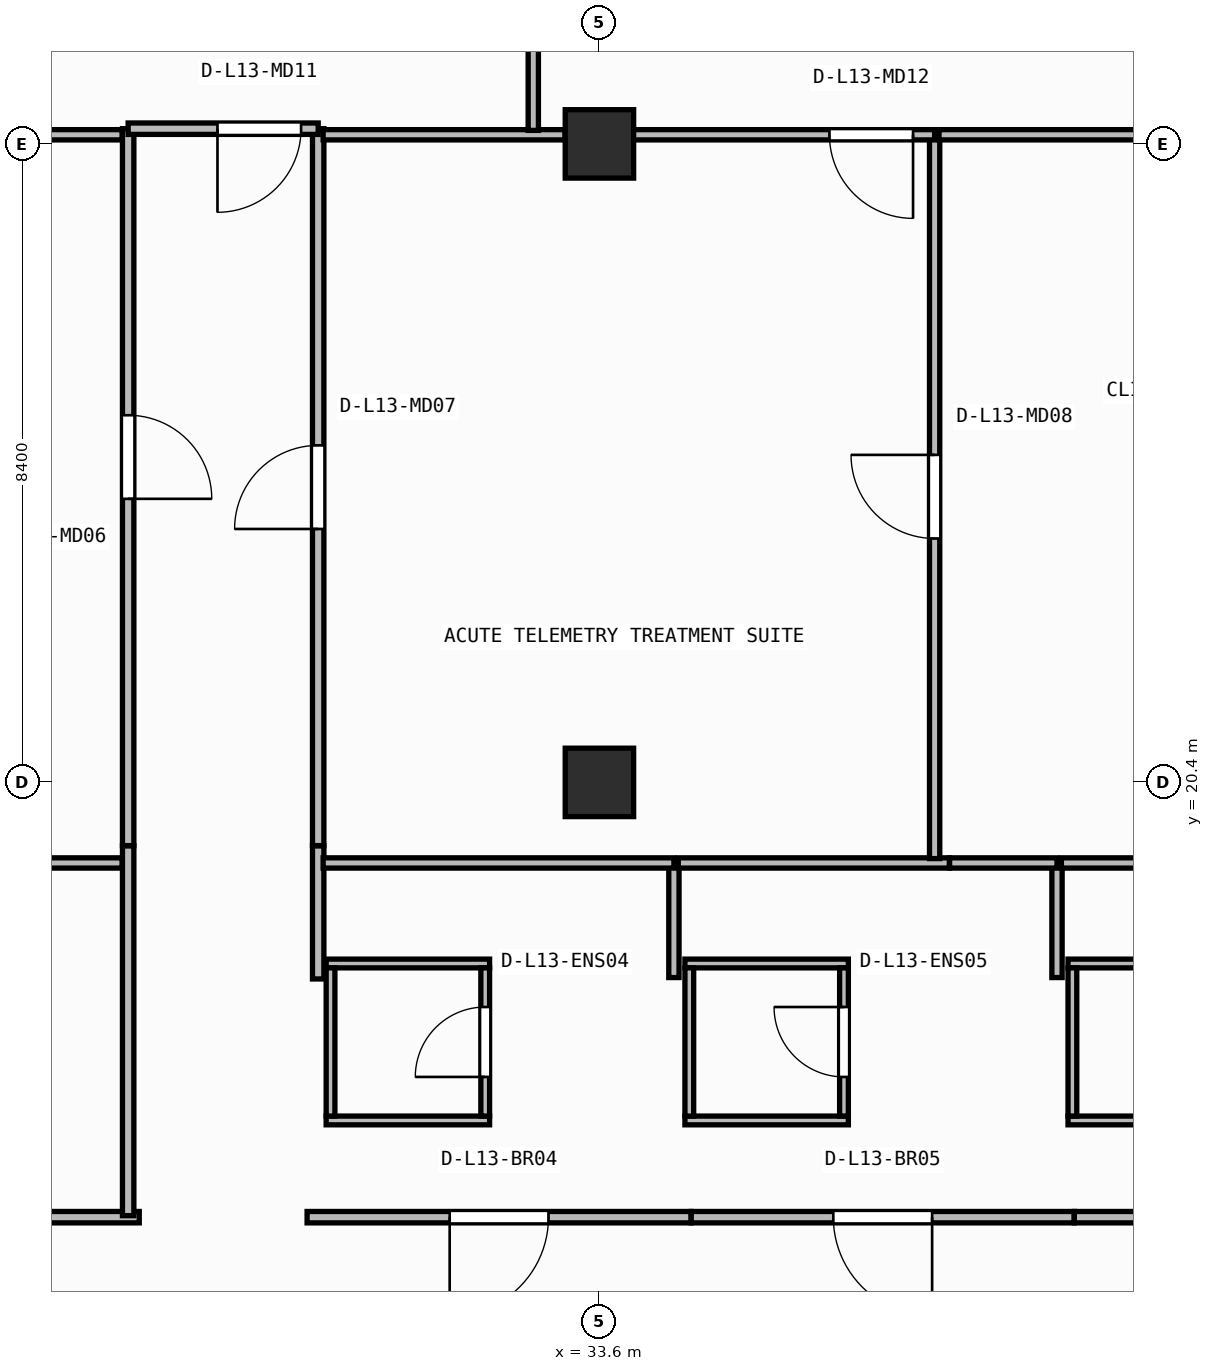
"""IFC4 building model, lengths in metres.
Left out: names, types, materials, properties, quantities, classifications, styles, units other than length and angle.
Written with IfcOpenShell. Run it as: python <this file> out.ifc"""

import sys

from ifc_helpers import new_model, si_unit, direction, frame, frame_2d, origin, origin_2d, place, context, subcontext, project, spatial, rectangle, extrude, element, fill, save


model = new_model("IFC4")
c1 = context("Model", 3, precision=1e-05, world=origin(), true_north=direction((0.0, 1.0)))
c2 = subcontext(c1, "Body", "Model", "MODEL_VIEW")
j1 = project(units=[si_unit("LENGTHUNIT", "METRE"), si_unit("PLANEANGLEUNIT", "RADIAN")], contexts=[c1])
p1 = place(None, origin())
s1 = spatial("IfcSite", under=j1, at=p1, CompositionType="ELEMENT")
p2 = place(p1, origin())
s2 = spatial("IfcBuilding", under=s1, at=p2, CompositionType="ELEMENT")
p3 = place(p2, frame((0.0, 0.0, 54.1)))
s3 = spatial("IfcBuildingStorey", under=s2, at=p3, CompositionType="ELEMENT", Elevation=54.1)
for number, where, z_axis, x_axis in (
    (1, (33.6, 20.4, 0.0), (0.0, 0.0, 1.0), (1.0, 0.0, 0.0)),
    (2, (33.6, 28.8, 0.0), (0.0, 0.0, 1.0), (1.0, 0.0, 0.0)),
):
    element("IfcColumn", number, at=place(p3, frame(where, z_axis=z_axis, x_axis=x_axis)), inside=s3, PredefinedType="COLUMN", context=c2, shape_type="SweptSolid", body=[
        extrude(rectangle(XDim=0.9, YDim=0.9, at=origin_2d()), origin(), (0.0, 0.0, 1.0), 3.95),
    ])
p4 = place(p3, frame((30.005, 15.952, 0.0), z_axis=(0.0, 0.0, 1.0), x_axis=(1.0, 0.0, 0.0)))
e3 = element("IfcWall", 3, at=p4, inside=s3, PredefinedType="PARTITIONING", context=c2, shape_type="SweptSolid", body=[
    extrude(rectangle(XDim=2.15, YDim=0.115, at=frame_2d((1.075, 0.0))), origin(), (0.0, 0.0, 1.0), 3.478),
])
p5 = place(p3, frame((30.005, 18.018, 0.0), z_axis=(0.0, 0.0, 1.0), x_axis=(1.0, 0.0, 0.0)))
e4 = element("IfcWall", 4, at=p5, inside=s3, PredefinedType="PARTITIONING", context=c2, shape_type="SweptSolid", body=[
    extrude(rectangle(XDim=2.15, YDim=0.115, at=frame_2d((1.075, 0.0))), origin(), (0.0, 0.0, 1.0), 3.71),
])
p6 = place(p3, frame((30.062, 16.01, 0.0), z_axis=(0.0, 0.0, 1.0), x_axis=(0.0, 1.0, 0.0)))
e5 = element("IfcWall", 5, at=p6, inside=s3, PredefinedType="PARTITIONING", context=c2, shape_type="SweptSolid", body=[
    extrude(rectangle(XDim=1.95, YDim=0.115, at=frame_2d((0.975, 0.0))), origin(), (0.0, 0.0, 1.0), 3.71),
])
p7 = place(p3, frame((32.097, 16.01, 0.0), z_axis=(0.0, 0.0, 1.0), x_axis=(0.0, 1.0, 0.0)))
e6 = element("IfcWall", 6, at=p7, inside=s3, PredefinedType="PARTITIONING", context=c2, shape_type="SweptSolid", body=[
    extrude(rectangle(XDim=1.95, YDim=0.115, at=frame_2d((0.975, 0.0))), origin(), (0.0, 0.0, 1.0), 3.71),
])
p8 = place(p7, frame((0.515, 0.0, 0.0)))
e7 = element("IfcOpeningElement", 7, at=p8, cuts=e6, PredefinedType="OPENING", context=c2, shape_type="SweptSolid", body=[
    extrude(rectangle(XDim=0.92, YDim=2.1, at=frame_2d((0.46, 1.05))), frame((0.0, 0.067, 0.0), z_axis=(0.0, -1.0, 0.0), x_axis=(1.0, 0.0, 0.0)), (0.0, 0.0, 1.0), 0.135),
])
p9 = place(p3, frame((34.725, 15.952, 0.0), z_axis=(0.0, 0.0, 1.0), x_axis=(1.0, 0.0, 0.0)))
e8 = element("IfcWall", 8, at=p9, inside=s3, PredefinedType="PARTITIONING", context=c2, shape_type="SweptSolid", body=[
    extrude(rectangle(XDim=2.15, YDim=0.115, at=frame_2d((1.075, 0.0))), origin(), (0.0, 0.0, 1.0), 3.478),
])
p10 = place(p3, frame((34.725, 18.018, 0.0), z_axis=(0.0, 0.0, 1.0), x_axis=(1.0, 0.0, 0.0)))
e9 = element("IfcWall", 9, at=p10, inside=s3, PredefinedType="PARTITIONING", context=c2, shape_type="SweptSolid", body=[
    extrude(rectangle(XDim=2.15, YDim=0.115, at=frame_2d((1.075, 0.0))), origin(), (0.0, 0.0, 1.0), 3.71),
])
p11 = place(p3, frame((34.782, 16.01, 0.0), z_axis=(0.0, 0.0, 1.0), x_axis=(0.0, 1.0, 0.0)))
e10 = element("IfcWall", 10, at=p11, inside=s3, PredefinedType="PARTITIONING", context=c2, shape_type="SweptSolid", body=[
    extrude(rectangle(XDim=1.95, YDim=0.115, at=frame_2d((0.975, 0.0))), origin(), (0.0, 0.0, 1.0), 3.71),
])
p12 = place(p3, frame((36.817, 16.01, 0.0), z_axis=(0.0, 0.0, 1.0), x_axis=(0.0, 1.0, 0.0)))
e11 = element("IfcWall", 11, at=p12, inside=s3, PredefinedType="PARTITIONING", context=c2, shape_type="SweptSolid", body=[
    extrude(rectangle(XDim=1.95, YDim=0.115, at=frame_2d((0.975, 0.0))), origin(), (0.0, 0.0, 1.0), 3.71),
])
p13 = place(p12, frame((0.515, 0.0, 0.0)))
e12 = element("IfcOpeningElement", 12, at=p13, cuts=e11, PredefinedType="OPENING", context=c2, shape_type="SweptSolid", body=[
    extrude(rectangle(XDim=0.92, YDim=2.1, at=frame_2d((0.46, 1.05))), frame((0.0, 0.067, 0.0), z_axis=(0.0, -1.0, 0.0), x_axis=(1.0, 0.0, 0.0)), (0.0, 0.0, 1.0), 0.135),
])
p14 = place(p3, frame((39.765, 15.952, 0.0), z_axis=(0.0, 0.0, 1.0), x_axis=(1.0, 0.0, 0.0)))
e13 = element("IfcWall", 13, at=p14, inside=s3, PredefinedType="PARTITIONING", context=c2, shape_type="SweptSolid", body=[
    extrude(rectangle(XDim=2.15, YDim=0.115, at=frame_2d((1.075, 0.0))), origin(), (0.0, 0.0, 1.0), 3.478),
])
p15 = place(p3, frame((39.765, 18.018, 0.0), z_axis=(0.0, 0.0, 1.0), x_axis=(1.0, 0.0, 0.0)))
e14 = element("IfcWall", 14, at=p15, inside=s3, PredefinedType="PARTITIONING", context=c2, shape_type="SweptSolid", body=[
    extrude(rectangle(XDim=2.15, YDim=0.115, at=frame_2d((1.075, 0.0))), origin(), (0.0, 0.0, 1.0), 3.71),
])
p16 = place(p3, frame((39.823, 16.01, 0.0), z_axis=(0.0, 0.0, 1.0), x_axis=(0.0, 1.0, 0.0)))
e15 = element("IfcWall", 15, at=p16, inside=s3, PredefinedType="PARTITIONING", context=c2, shape_type="SweptSolid", body=[
    extrude(rectangle(XDim=1.95, YDim=0.115, at=frame_2d((0.975, 0.0))), origin(), (0.0, 0.0, 1.0), 3.71),
])
p17 = place(p3, frame((27.546, 14.68, 0.0), z_axis=(0.0, 0.0, 1.0), x_axis=(-1.0, 0.0, 0.0)))
e16 = element("IfcWall", 16, at=p17, inside=s3, PredefinedType="PARTITIONING", context=c2, shape_type="SweptSolid", body=[
    extrude(rectangle(XDim=4.948, YDim=0.15, at=frame_2d((2.474, 0.0))), origin(), (0.0, 0.0, 1.0), 3.71),
])
p18 = place(p17, frame((1.924, 0.0, 0.0)))
e17 = element("IfcOpeningElement", 17, at=p18, cuts=e16, PredefinedType="OPENING", context=c2, shape_type="SweptSolid", body=[
    extrude(rectangle(XDim=1.1, YDim=2.1, at=frame_2d((0.55, 1.05))), frame((0.0, 0.085, 0.0), z_axis=(0.0, -1.0, 0.0), x_axis=(1.0, 0.0, 0.0)), (0.0, 0.0, 1.0), 0.17),
])
p19 = place(p3, frame((34.806, 14.68, 0.0), z_axis=(0.0, 0.0, 1.0), x_axis=(-1.0, 0.0, 0.0)))
e18 = element("IfcWall", 18, at=p19, inside=s3, PredefinedType="PARTITIONING", context=c2, shape_type="SweptSolid", body=[
    extrude(rectangle(XDim=5.052, YDim=0.15, at=frame_2d((2.526, 0.0))), origin(), (0.0, 0.0, 1.0), 3.71),
])
p20 = place(p19, frame((1.876, 0.0, 0.0)))
e19 = element("IfcOpeningElement", 19, at=p20, cuts=e18, PredefinedType="OPENING", context=c2, shape_type="SweptSolid", body=[
    extrude(rectangle(XDim=1.3, YDim=2.15, at=frame_2d((0.65, 1.075))), frame((0.0, 0.085, 0.0), z_axis=(0.0, -1.0, 0.0), x_axis=(1.0, 0.0, 0.0)), (0.0, 0.0, 1.0), 0.17),
])
p21 = place(p3, frame((39.846, 14.68, 0.0), z_axis=(0.0, 0.0, 1.0), x_axis=(-1.0, 0.0, 0.0)))
e20 = element("IfcWall", 20, at=p21, inside=s3, PredefinedType="PARTITIONING", context=c2, shape_type="SweptSolid", body=[
    extrude(rectangle(XDim=5.038, YDim=0.15, at=frame_2d((2.519, 0.0))), origin(), (0.0, 0.0, 1.0), 3.71),
])
p22 = place(p21, frame((1.869, 0.0, 0.0)))
e21 = element("IfcOpeningElement", 21, at=p22, cuts=e20, PredefinedType="OPENING", context=c2, shape_type="SweptSolid", body=[
    extrude(rectangle(XDim=1.3, YDim=2.15, at=frame_2d((0.65, 1.075))), frame((0.0, 0.085, 0.0), z_axis=(0.0, -1.0, 0.0), x_axis=(1.0, 0.0, 0.0)), (0.0, 0.0, 1.0), 0.17),
])
p23 = place(p3, frame((44.136, 14.68, 0.0), z_axis=(0.0, 0.0, 1.0), x_axis=(-1.0, 0.0, 0.0)))
e22 = element("IfcWall", 22, at=p23, inside=s3, PredefinedType="PARTITIONING", context=c2, shape_type="SweptSolid", body=[
    extrude(rectangle(XDim=4.288, YDim=0.15, at=frame_2d((2.144, 0.0))), origin(), (0.0, 0.0, 1.0), 3.71),
])
p24 = place(p23, frame((1.494, 0.0, 0.0)))
e23 = element("IfcOpeningElement", 23, at=p24, cuts=e22, PredefinedType="OPENING", context=c2, shape_type="SweptSolid", body=[
    extrude(rectangle(XDim=1.3, YDim=2.15, at=frame_2d((0.65, 1.075))), frame((0.0, 0.085, 0.0), z_axis=(0.0, -1.0, 0.0), x_axis=(1.0, 0.0, 0.0)), (0.0, 0.0, 1.0), 0.17),
])
p25 = place(p3, frame((27.4, 19.566, 0.0), z_axis=(0.0, 0.0, 1.0), x_axis=(0.0, -1.0, 0.0)))
e24 = element("IfcWall", 24, at=p25, inside=s3, PredefinedType="PARTITIONING", context=c2, shape_type="SweptSolid", body=[
    extrude(rectangle(XDim=4.866, YDim=0.15, at=frame_2d((2.433, 0.0))), origin(), (0.0, 0.0, 1.0), 3.71),
])
p26 = place(p3, frame((27.4, 29.0, 0.0), z_axis=(0.0, 0.0, 1.0), x_axis=(0.0, -1.0, 0.0)))
e25 = element("IfcWall", 25, at=p26, inside=s3, PredefinedType="PARTITIONING", context=c2, shape_type="SweptSolid", body=[
    extrude(rectangle(XDim=9.432, YDim=0.15, at=frame_2d((4.716, 0.0))), origin(), (0.0, 0.0, 1.0), 3.71),
])
p27 = place(p26, frame((3.769, 0.0, 0.0)))
e26 = element("IfcOpeningElement", 26, at=p27, cuts=e25, PredefinedType="OPENING", context=c2, shape_type="SweptSolid", body=[
    extrude(rectangle(XDim=1.1, YDim=2.1, at=frame_2d((0.55, 1.05))), frame((0.0, 0.085, 0.0), z_axis=(0.0, -1.0, 0.0), x_axis=(1.0, 0.0, 0.0)), (0.0, 0.0, 1.0), 0.17),
])
p28 = place(p3, frame((29.9, 17.814, 0.0), z_axis=(0.0, 0.0, 1.0), x_axis=(0.0, 1.0, 0.0)))
e27 = element("IfcWall", 27, at=p28, inside=s3, PredefinedType="PARTITIONING", context=c2, shape_type="SweptSolid", body=[
    extrude(rectangle(XDim=1.752, YDim=0.15, at=frame_2d((0.876, 0.0))), origin(), (0.0, 0.0, 1.0), 3.71),
])
p29 = place(p3, frame((29.9, 19.568, 0.0), z_axis=(0.0, 0.0, 1.0), x_axis=(0.0, 1.0, 0.0)))
e28 = element("IfcWall", 28, at=p29, inside=s3, PredefinedType="PARTITIONING", context=c2, shape_type="SweptSolid", body=[
    extrude(rectangle(XDim=9.432, YDim=0.15, at=frame_2d((4.716, 0.0))), origin(), (0.0, 0.0, 1.0), 3.71),
])
p30 = place(p29, frame((4.166, 0.0, 0.0)))
e29 = element("IfcOpeningElement", 29, at=p30, cuts=e28, PredefinedType="OPENING", context=c2, shape_type="SweptSolid", body=[
    extrude(rectangle(XDim=1.1, YDim=2.1, at=frame_2d((0.55, 1.05))), frame((0.0, 0.085, 0.0), z_axis=(0.0, -1.0, 0.0), x_axis=(1.0, 0.0, 0.0)), (0.0, 0.0, 1.0), 0.17),
])
p31 = place(p3, frame((29.9, 29.0, 0.0), z_axis=(0.0, 0.0, 1.0), x_axis=(-1.0, 0.0, 0.0)))
e30 = element("IfcWall", 30, at=p31, inside=s3, PredefinedType="PARTITIONING", context=c2, shape_type="SweptSolid", body=[
    extrude(rectangle(XDim=2.5, YDim=0.15, at=frame_2d((1.25, 0.0))), origin(), (0.0, 0.0, 1.0), 3.326),
])
p32 = place(p31, frame((0.225, 0.0, 0.0)))
e31 = element("IfcOpeningElement", 31, at=p32, cuts=e30, PredefinedType="OPENING", context=c2, shape_type="SweptSolid", body=[
    extrude(rectangle(XDim=1.1, YDim=2.1, at=frame_2d((0.55, 1.05))), frame((0.0, 0.085, 0.0), z_axis=(0.0, -1.0, 0.0), x_axis=(1.0, 0.0, 0.0)), (0.0, 0.0, 1.0), 0.17),
])
p33 = place(p3, frame((27.32, 19.34, 0.0), z_axis=(0.0, 0.0, 1.0), x_axis=(-1.0, 0.0, 0.0)))
e32 = element("IfcWall", 32, at=p33, inside=s3, PredefinedType="PARTITIONING", context=c2, shape_type="SweptSolid", body=[
    extrude(rectangle(XDim=4.893, YDim=0.135, at=frame_2d((2.446, 0.0))), origin(), (0.0, 0.0, 1.0), 3.71),
])
p34 = place(p3, frame((27.32, 28.92, 0.0), z_axis=(0.0, 0.0, 1.0), x_axis=(-1.0, 0.0, 0.0)))
e33 = element("IfcWall", 33, at=p34, inside=s3, PredefinedType="PARTITIONING", context=c2, shape_type="SweptSolid", body=[
    extrude(rectangle(XDim=9.453, YDim=0.135, at=frame_2d((4.726, 0.0))), origin(), (0.0, 0.0, 1.0), 3.073),
])
p35 = place(p3, frame((34.58, 17.833, 0.0), z_axis=(0.0, 0.0, 1.0), x_axis=(0.0, 1.0, 0.0)))
e34 = element("IfcWall", 34, at=p35, inside=s3, PredefinedType="PARTITIONING", context=c2, shape_type="SweptSolid", body=[
    extrude(rectangle(XDim=1.508, YDim=0.135, at=frame_2d((0.754, 0.0))), origin(), (0.0, 0.0, 1.0), 3.71),
])
p36 = place(p3, frame((34.58, 19.34, 0.0), z_axis=(0.0, 0.0, 1.0), x_axis=(-1.0, 0.0, 0.0)))
e35 = element("IfcWall", 35, at=p36, inside=s3, PredefinedType="PARTITIONING", context=c2, shape_type="SweptSolid", body=[
    extrude(rectangle(XDim=4.615, YDim=0.135, at=frame_2d((2.308, 0.0))), origin(), (0.0, 0.0, 1.0), 3.71),
])
p37 = place(p3, frame((39.62, 17.833, 0.0), z_axis=(0.0, 0.0, 1.0), x_axis=(0.0, 1.0, 0.0)))
e36 = element("IfcWall", 36, at=p37, inside=s3, PredefinedType="PARTITIONING", context=c2, shape_type="SweptSolid", body=[
    extrude(rectangle(XDim=1.508, YDim=0.135, at=frame_2d((0.754, 0.0))), origin(), (0.0, 0.0, 1.0), 3.71),
])
p38 = place(p3, frame((38.205, 19.34, 0.0), z_axis=(0.0, 0.0, 1.0), x_axis=(-1.0, 0.0, 0.0)))
e37 = element("IfcWall", 37, at=p38, inside=s3, PredefinedType="PARTITIONING", context=c2, shape_type="SweptSolid", body=[
    extrude(rectangle(XDim=3.567, YDim=0.135, at=frame_2d((1.784, 0.0))), origin(), (0.0, 0.0, 1.0), 3.71),
])
p39 = place(p3, frame((39.62, 19.34, 0.0), z_axis=(0.0, 0.0, 1.0), x_axis=(-1.0, 0.0, 0.0)))
e38 = element("IfcWall", 38, at=p39, inside=s3, PredefinedType="PARTITIONING", context=c2, shape_type="SweptSolid", body=[
    extrude(rectangle(XDim=1.414, YDim=0.135, at=frame_2d((0.707, 0.0))), origin(), (0.0, 0.0, 1.0), 3.71),
])
p40 = place(p3, frame((43.91, 19.34, 0.0), z_axis=(0.0, 0.0, 1.0), x_axis=(-1.0, 0.0, 0.0)))
e39 = element("IfcWall", 39, at=p40, inside=s3, PredefinedType="PARTITIONING", context=c2, shape_type="SweptSolid", body=[
    extrude(rectangle(XDim=4.232, YDim=0.135, at=frame_2d((2.116, 0.0))), origin(), (0.0, 0.0, 1.0), 3.71),
])
p41 = place(p3, frame((38.01, 19.397, 0.0), z_axis=(0.0, 0.0, 1.0), x_axis=(0.0, 1.0, 0.0)))
e40 = element("IfcWall", 40, at=p41, inside=s3, PredefinedType="PARTITIONING", context=c2, shape_type="SweptSolid", body=[
    extrude(rectangle(XDim=9.522, YDim=0.135, at=frame_2d((4.761, 0.0))), origin(), (0.0, 0.0, 1.0), 3.71),
])
p42 = place(p41, frame((4.211, 0.0, 0.0)))
e41 = element("IfcOpeningElement", 41, at=p42, cuts=e40, PredefinedType="OPENING", context=c2, shape_type="SweptSolid", body=[
    extrude(rectangle(XDim=1.1, YDim=2.1, at=frame_2d((0.55, 1.05))), frame((0.0, 0.077, 0.0), z_axis=(0.0, -1.0, 0.0), x_axis=(1.0, 0.0, 0.0)), (0.0, 0.0, 1.0), 0.155),
])
p43 = place(p3, frame((33.15, 28.92, 0.0), z_axis=(0.0, 0.0, 1.0), x_axis=(-1.0, 0.0, 0.0)))
e42 = element("IfcWall", 42, at=p43, inside=s3, PredefinedType="PARTITIONING", context=c2, shape_type="SweptSolid", body=[
    extrude(rectangle(XDim=3.185, YDim=0.135, at=frame_2d((1.592, 0.0))), origin(), (0.0, 0.0, 1.0), 3.326),
])
p44 = place(p3, frame((38.01, 28.92, 0.0), z_axis=(0.0, 0.0, 1.0), x_axis=(-1.0, 0.0, 0.0)))
e43 = element("IfcWall", 43, at=p44, inside=s3, PredefinedType="PARTITIONING", context=c2, shape_type="SweptSolid", body=[
    extrude(rectangle(XDim=4.858, YDim=0.135, at=frame_2d((2.429, 0.0))), origin(), (0.0, 0.0, 1.0), 3.326),
])
p45 = place(p44, frame((0.284, 0.0, 0.0)))
e44 = element("IfcOpeningElement", 44, at=p45, cuts=e43, PredefinedType="OPENING", context=c2, shape_type="SweptSolid", body=[
    extrude(rectangle(XDim=1.1, YDim=2.1, at=frame_2d((0.55, 1.05))), frame((0.0, 0.077, 0.0), z_axis=(0.0, -1.0, 0.0), x_axis=(1.0, 0.0, 0.0)), (0.0, 0.0, 1.0), 0.155),
])
p46 = place(p3, frame((47.44, 28.92, 0.0), z_axis=(0.0, 0.0, 1.0), x_axis=(-1.0, 0.0, 0.0)))
e45 = element("IfcWall", 45, at=p46, inside=s3, PredefinedType="PARTITIONING", context=c2, shape_type="SweptSolid", body=[
    extrude(rectangle(XDim=9.373, YDim=0.135, at=frame_2d((4.686, 0.0))), origin(), (0.0, 0.0, 1.0), 3.073),
])
p47 = place(p3, frame((32.73, 28.978, 0.0), z_axis=(0.0, 0.0, 1.0), x_axis=(0.0, 1.0, 0.0)))
e46 = element("IfcWall", 46, at=p47, inside=s3, PredefinedType="PARTITIONING", context=c2, shape_type="SweptSolid", body=[
    extrude(rectangle(XDim=2.433, YDim=0.135, at=frame_2d((1.217, 0.0))), origin(), (0.0, 0.0, 1.0), 3.71),
])
p48 = place(p8, origin())
e47 = element("IfcDoor", 47, at=p48, inside=s3, OperationType="SINGLE_SWING_LEFT", PredefinedType="DOOR", context=c2, shape_type="SweptSolid", body=[
    extrude(rectangle(XDim=0.92, YDim=2.1, at=frame_2d((0.46, 1.05))), frame((0.0, 0.025, 0.0), z_axis=(0.0, -1.0, 0.0), x_axis=(1.0, 0.0, 0.0)), (0.0, 0.0, 1.0), 0.05),
])
fill(e7, e47)
p49 = place(p13, origin())
e48 = element("IfcDoor", 48, at=p49, inside=s3, OperationType="SINGLE_SWING_RIGHT", PredefinedType="DOOR", context=c2, shape_type="SweptSolid", body=[
    extrude(rectangle(XDim=0.92, YDim=2.1, at=frame_2d((0.46, 1.05))), frame((0.0, 0.025, 0.0), z_axis=(0.0, -1.0, 0.0), x_axis=(1.0, 0.0, 0.0)), (0.0, 0.0, 1.0), 0.05),
])
fill(e12, e48)
p50 = place(p20, origin())
e49 = element("IfcDoor", 49, at=p50, inside=s3, OperationType="SINGLE_SWING_RIGHT", PredefinedType="DOOR", context=c2, shape_type="SweptSolid", body=[
    extrude(rectangle(XDim=1.3, YDim=2.15, at=frame_2d((0.65, 1.075))), frame((0.0, 0.025, 0.0), z_axis=(0.0, -1.0, 0.0), x_axis=(1.0, 0.0, 0.0)), (0.0, 0.0, 1.0), 0.05),
])
fill(e19, e49)
p51 = place(p22, origin())
e50 = element("IfcDoor", 50, at=p51, inside=s3, OperationType="SINGLE_SWING_LEFT", PredefinedType="DOOR", context=c2, shape_type="SweptSolid", body=[
    extrude(rectangle(XDim=1.3, YDim=2.15, at=frame_2d((0.65, 1.075))), frame((0.0, 0.025, 0.0), z_axis=(0.0, -1.0, 0.0), x_axis=(1.0, 0.0, 0.0)), (0.0, 0.0, 1.0), 0.05),
])
fill(e21, e50)
p52 = place(p27, origin())
e51 = element("IfcDoor", 51, at=p52, inside=s3, OperationType="SINGLE_SWING_RIGHT", PredefinedType="DOOR", context=c2, shape_type="SweptSolid", body=[
    extrude(rectangle(XDim=1.1, YDim=2.1, at=frame_2d((0.55, 1.05))), frame((0.0, 0.025, 0.0), z_axis=(0.0, -1.0, 0.0), x_axis=(1.0, 0.0, 0.0)), (0.0, 0.0, 1.0), 0.05),
])
fill(e26, e51)
p53 = place(p30, origin())
e52 = element("IfcDoor", 52, at=p53, inside=s3, OperationType="SINGLE_SWING_LEFT", PredefinedType="DOOR", context=c2, shape_type="SweptSolid", body=[
    extrude(rectangle(XDim=1.1, YDim=2.1, at=frame_2d((0.55, 1.05))), frame((0.0, 0.025, 0.0), z_axis=(0.0, -1.0, 0.0), x_axis=(1.0, 0.0, 0.0)), (0.0, 0.0, 1.0), 0.05),
])
fill(e29, e52)
p54 = place(p32, origin())
e53 = element("IfcDoor", 53, at=p54, inside=s3, OperationType="SINGLE_SWING_RIGHT", PredefinedType="DOOR", context=c2, shape_type="SweptSolid", body=[
    extrude(rectangle(XDim=1.1, YDim=2.1, at=frame_2d((0.55, 1.05))), frame((0.0, 0.025, 0.0), z_axis=(0.0, -1.0, 0.0), x_axis=(1.0, 0.0, 0.0)), (0.0, 0.0, 1.0), 0.05),
])
fill(e31, e53)
p55 = place(p42, origin())
e54 = element("IfcDoor", 54, at=p55, inside=s3, OperationType="SINGLE_SWING_RIGHT", PredefinedType="DOOR", context=c2, shape_type="SweptSolid", body=[
    extrude(rectangle(XDim=1.1, YDim=2.1, at=frame_2d((0.55, 1.05))), frame((0.0, 0.025, 0.0), z_axis=(0.0, -1.0, 0.0), x_axis=(1.0, 0.0, 0.0)), (0.0, 0.0, 1.0), 0.05),
])
fill(e41, e54)
p56 = place(p45, origin())
e55 = element("IfcDoor", 55, at=p56, inside=s3, OperationType="SINGLE_SWING_LEFT", PredefinedType="DOOR", context=c2, shape_type="SweptSolid", body=[
    extrude(rectangle(XDim=1.1, YDim=2.1, at=frame_2d((0.55, 1.05))), frame((0.0, 0.025, 0.0), z_axis=(0.0, -1.0, 0.0), x_axis=(1.0, 0.0, 0.0)), (0.0, 0.0, 1.0), 0.05),
])
fill(e44, e55)
save(model, sys.argv[1])
